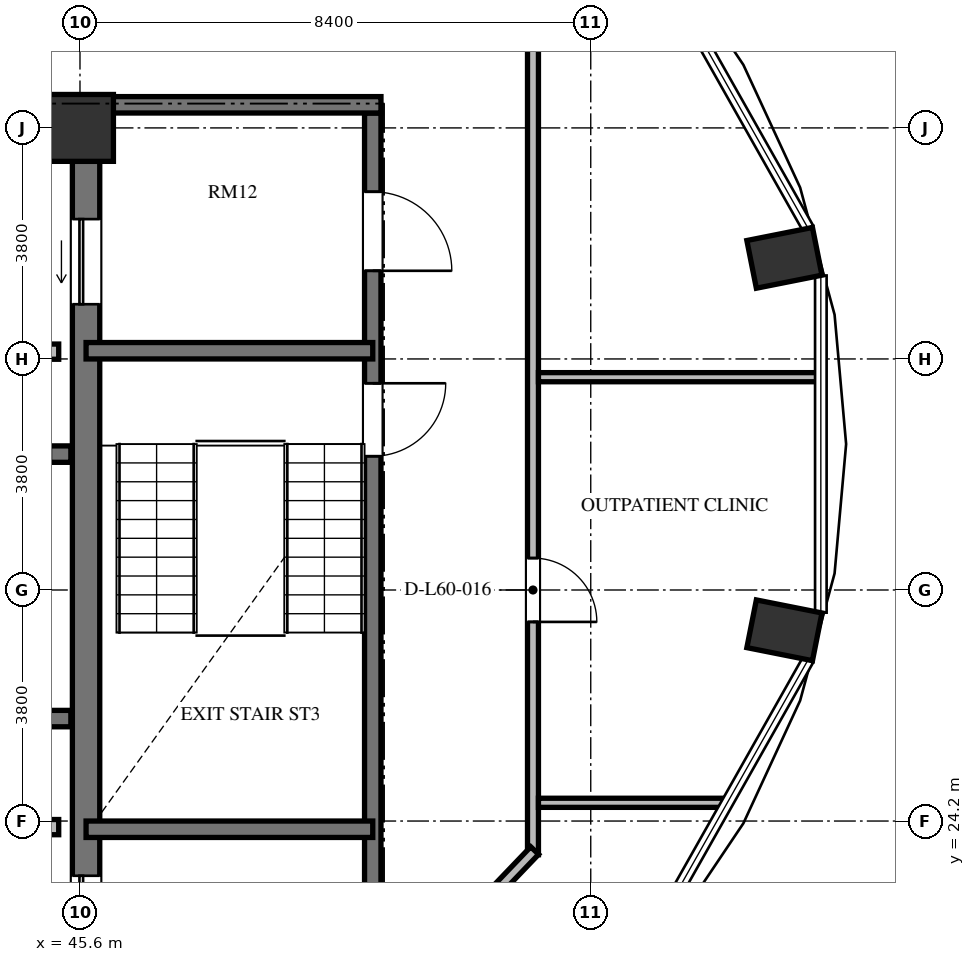
"""IFC4 building model, lengths in metres.
Left out: names, types, materials, properties, quantities, classifications, styles, units other than length and angle.
Written with IfcOpenShell. Run it as: python <this file> out.ifc"""

import sys

from ifc_helpers import new_model, si_unit, direction, frame, frame_2d, origin, origin_2d, place, context, subcontext, project, spatial, rectangle, extrude, element, fill, save


model = new_model("IFC4")
c1 = context("Model", 3, precision=1e-05, world=origin(), true_north=direction((0.0, 1.0)))
c2 = subcontext(c1, "Body", "Model", "MODEL_VIEW")
j1 = project(units=[si_unit("LENGTHUNIT", "METRE"), si_unit("PLANEANGLEUNIT", "RADIAN")], contexts=[c1])
p1 = place(None, origin())
s1 = spatial("IfcSite", under=j1, at=p1, CompositionType="ELEMENT")
p2 = place(p1, origin())
s2 = spatial("IfcBuilding", under=s1, at=p2, CompositionType="ELEMENT")
p3 = place(p2, frame((0.0, 0.0, 231.312)))
s3 = spatial("IfcBuildingStorey", under=s2, at=p3, CompositionType="ELEMENT", Elevation=231.312)
for number, where, z_axis, x_axis in (
    (1, (57.185, 27.337, 0.0), (0.0, 0.0, 1.0), (0.981, -0.195, 0.0)),
    (2, (57.185, 33.463, 0.0), (0.0, 0.0, 1.0), (0.981, 0.195, 0.0)),
):
    element("IfcColumn", number, at=place(p3, frame(where, z_axis=z_axis, x_axis=x_axis)), inside=s3, PredefinedType="COLUMN", context=c2, shape_type="SweptSolid", body=[
        extrude(rectangle(XDim=1.1, YDim=0.8, at=origin_2d()), origin(), (0.0, 0.0, 1.0), 3.648),
    ])
p4 = place(p3, frame((45.6, 35.6, 0.0), z_axis=(0.0, 0.0, 1.0), x_axis=(1.0, 0.0, 0.0)))
e3 = element("IfcColumn", 3, at=p4, inside=s3, PredefinedType="COLUMN", context=c2, shape_type="SweptSolid", body=[
    extrude(rectangle(XDim=1.1, YDim=1.1, at=origin_2d()), origin(), (0.0, 0.0, 1.0), 3.648),
])
p5 = place(p3, frame((45.7, 20.95, 0.0), z_axis=(0.0, 0.0, 1.0), x_axis=(0.0, 1.0, 0.0)))
e4 = element("IfcWall", 4, at=p5, inside=s3, PredefinedType="SHEAR", context=c2, shape_type="SweptSolid", body=[
    extrude(rectangle(XDim=14.1, YDim=0.45, at=frame_2d((7.05, 0.0))), origin(), (0.0, 0.0, 1.0), 3.648),
])
p6 = place(p5, frame((11.75, 0.0, 0.0)))
e5 = element("IfcOpeningElement", 5, at=p6, cuts=e4, PredefinedType="OPENING", context=c2, shape_type="SweptSolid", body=[
    extrude(rectangle(XDim=1.4, YDim=2.3, at=frame_2d((0.7, 1.15))), frame((0.0, 0.235, 0.0), z_axis=(0.0, -1.0, 0.0), x_axis=(1.0, 0.0, 0.0)), (0.0, 0.0, 1.0), 0.47),
])
p7 = place(p5, frame((0.95, 0.0, 0.0)))
e6 = element("IfcOpeningElement", 6, at=p7, cuts=e4, PredefinedType="OPENING", context=c2, shape_type="SweptSolid", body=[
    extrude(rectangle(XDim=1.4, YDim=2.3, at=frame_2d((0.7, 1.15))), frame((0.0, 0.235, 0.0), z_axis=(0.0, -1.0, 0.0), x_axis=(1.0, 0.0, 0.0)), (0.0, 0.0, 1.0), 0.47),
])
p8 = place(p3, frame((37.465, 30.235, 0.0), z_axis=(0.0, 0.0, 1.0), x_axis=(1.0, 0.0, 0.0)))
e7 = element("IfcWall", 7, at=p8, inside=s3, PredefinedType="SHEAR", context=c2, shape_type="SweptSolid", body=[
    extrude(rectangle(XDim=7.985, YDim=0.27, at=frame_2d((3.992, 0.0))), origin(), (0.0, 0.0, 1.0), 3.648),
])
p9 = place(p8, frame((6.455, 0.0, 0.0)))
e8 = element("IfcOpeningElement", 8, at=p9, cuts=e7, PredefinedType="OPENING", context=c2, shape_type="SweptSolid", body=[
    extrude(rectangle(XDim=1.2, YDim=2.15, at=frame_2d((0.6, 1.075))), frame((0.0, 0.145, 0.0), z_axis=(0.0, -1.0, 0.0), x_axis=(1.0, 0.0, 0.0)), (0.0, 0.0, 1.0), 0.29),
])
p10 = place(p3, frame((37.465, 25.885, 0.0), z_axis=(0.0, 0.0, 1.0), x_axis=(1.0, 0.0, 0.0)))
e9 = element("IfcWall", 9, at=p10, inside=s3, PredefinedType="SHEAR", context=c2, shape_type="SweptSolid", body=[
    extrude(rectangle(XDim=7.985, YDim=0.27, at=frame_2d((3.992, 0.0))), origin(), (0.0, 0.0, 1.0), 3.648),
])
for number, where, z_axis, x_axis in (
    (10, (42.95, 31.92, 0.0), (0.0, 0.0, 1.0), (1.0, 0.0, 0.0)),
    (11, (42.95, 24.1, 0.0), (0.0, 0.0, 1.0), (1.0, 0.0, 0.0)),
):
    element("IfcWall", number, at=place(p3, frame(where, z_axis=z_axis, x_axis=x_axis)), inside=s3, PredefinedType="SOLIDWALL", context=c2, shape_type="SweptSolid", body=[
        extrude(rectangle(XDim=2.3, YDim=0.25, at=frame_2d((1.15, 0.0))), origin(), (0.0, 0.0, 1.0), 3.448),
    ])
p11 = place(p3, frame((50.415, 35.845, 0.0), z_axis=(0.0, 0.0, 1.0), x_axis=(0.0, -1.0, 0.0)))
e12 = element("IfcWall", 12, at=p11, inside=s3, PredefinedType="SHEAR", context=c2, shape_type="SweptSolid", body=[
    extrude(rectangle(XDim=15.825, YDim=0.27, at=frame_2d((7.913, 0.0))), origin(), (0.0, 0.0, 1.0), 3.648),
])
p12 = place(p11, frame((4.445, 0.0, 0.0)))
e13 = element("IfcOpeningElement", 13, at=p12, cuts=e12, PredefinedType="OPENING", context=c2, shape_type="SweptSolid", body=[
    extrude(rectangle(XDim=1.2, YDim=2.15, at=frame_2d((0.6, 1.075))), frame((0.0, 0.145, 0.0), z_axis=(0.0, -1.0, 0.0), x_axis=(1.0, 0.0, 0.0)), (0.0, 0.0, 1.0), 0.29),
])
p13 = place(p11, frame((1.295, 0.0, 0.0)))
e14 = element("IfcOpeningElement", 14, at=p13, cuts=e12, PredefinedType="OPENING", context=c2, shape_type="SweptSolid", body=[
    extrude(rectangle(XDim=1.3, YDim=2.2, at=frame_2d((0.65, 1.1))), frame((0.0, 0.145, 0.0), z_axis=(0.0, -1.0, 0.0), x_axis=(1.0, 0.0, 0.0)), (0.0, 0.0, 1.0), 0.29),
])
p14 = place(p11, frame((13.095, 0.0, 0.0)))
e15 = element("IfcOpeningElement", 15, at=p14, cuts=e12, PredefinedType="OPENING", context=c2, shape_type="SweptSolid", body=[
    extrude(rectangle(XDim=1.3, YDim=2.2, at=frame_2d((0.65, 1.1))), frame((0.0, 0.145, 0.0), z_axis=(0.0, -1.0, 0.0), x_axis=(1.0, 0.0, 0.0)), (0.0, 0.0, 1.0), 0.29),
])
p15 = place(p3, frame((45.925, 35.98, 0.0), z_axis=(0.0, 0.0, 1.0), x_axis=(1.0, 0.0, 0.0)))
e16 = element("IfcWall", 16, at=p15, inside=s3, PredefinedType="SHEAR", context=c2, shape_type="SweptSolid", body=[
    extrude(rectangle(XDim=4.625, YDim=0.27, at=frame_2d((2.312, 0.0))), origin(), (0.0, 0.0, 1.0), 3.648),
])
for number, where, z_axis, x_axis in (
    (17, (45.7, 31.935, 0.0), (0.0, 0.0, 1.0), (1.0, 0.0, 0.0)),
    (18, (45.7, 24.065, 0.0), (0.0, 0.0, 1.0), (1.0, 0.0, 0.0)),
):
    element("IfcWall", number, at=place(p3, frame(where, z_axis=z_axis, x_axis=x_axis)), inside=s3, PredefinedType="SHEAR", context=c2, shape_type="SweptSolid", body=[
        extrude(rectangle(XDim=4.715, YDim=0.27, at=frame_2d((2.357, 0.0))), origin(), (0.0, 0.0, 1.0), 3.648),
    ])
p16 = place(p3, frame((53.05, 37.155, 0.0), z_axis=(0.0, 0.0, 1.0), x_axis=(0.0, -1.0, 0.0)))
e19 = element("IfcWall", 19, at=p16, inside=s3, PredefinedType="PARTITIONING", context=c2, shape_type="SweptSolid", body=[
    extrude(rectangle(XDim=13.509, YDim=0.18, at=frame_2d((6.754, 0.0))), origin(), (0.0, 0.0, 1.0), 3.448),
])
p17 = place(p16, frame((8.629, 0.0, 0.0)))
e20 = element("IfcOpeningElement", 20, at=p17, cuts=e19, PredefinedType="OPENING", context=c2, shape_type="SweptSolid", body=[
    extrude(rectangle(XDim=1.05, YDim=2.15, at=frame_2d((0.525, 1.075))), frame((0.0, 0.1, 0.0), z_axis=(0.0, -1.0, 0.0), x_axis=(1.0, 0.0, 0.0)), (0.0, 0.0, 1.0), 0.2),
])
p18 = place(p3, frame((53.078, 23.714, 0.0), z_axis=(0.0, 0.0, 1.0), x_axis=(-0.691353379446, -0.722516785085, 0.0)))
e21 = element("IfcWall", 21, at=p18, inside=s3, PredefinedType="PARTITIONING", context=c2, shape_type="SweptSolid", body=[
    extrude(rectangle(XDim=3.604, YDim=0.18, at=frame_2d((1.802, 0.0))), origin(), (0.0, 0.0, 1.0), 3.448),
])
p19 = place(p3, frame((53.14, 24.5, 0.0), z_axis=(0.0, 0.0, 1.0), x_axis=(1.0, 0.0, 0.0)))
e22 = element("IfcWall", 22, at=p19, inside=s3, PredefinedType="PARTITIONING", context=c2, shape_type="SweptSolid", body=[
    extrude(rectangle(XDim=3.095, YDim=0.15, at=frame_2d((1.548, 0.0))), origin(), (0.0, 0.0, 1.0), 3.448),
])
p20 = place(p3, frame((53.14, 31.5, 0.0), z_axis=(0.0, 0.0, 1.0), x_axis=(1.0, 0.0, 0.0)))
e23 = element("IfcWall", 23, at=p20, inside=s3, PredefinedType="PARTITIONING", context=c2, shape_type="SweptSolid", body=[
    extrude(rectangle(XDim=4.632, YDim=0.15, at=frame_2d((2.316, 0.0))), origin(), (0.0, 0.0, 1.0), 3.448),
])
p21 = place(p6, origin())
e24 = element("IfcDoor", 24, at=p21, inside=s3, OperationType="SLIDING_TO_LEFT", PredefinedType="DOOR", context=c2, shape_type="SweptSolid", body=[
    extrude(rectangle(XDim=1.4, YDim=2.3, at=frame_2d((0.7, 1.15))), frame((0.0, 0.025, 0.0), z_axis=(0.0, -1.0, 0.0), x_axis=(1.0, 0.0, 0.0)), (0.0, 0.0, 1.0), 0.05),
])
fill(e5, e24)
p22 = place(p7, origin())
e25 = element("IfcDoor", 25, at=p22, inside=s3, OperationType="SLIDING_TO_LEFT", PredefinedType="DOOR", context=c2, shape_type="SweptSolid", body=[
    extrude(rectangle(XDim=1.4, YDim=2.3, at=frame_2d((0.7, 1.15))), frame((0.0, 0.025, 0.0), z_axis=(0.0, -1.0, 0.0), x_axis=(1.0, 0.0, 0.0)), (0.0, 0.0, 1.0), 0.05),
])
fill(e6, e25)
p23 = place(p12, origin())
e26 = element("IfcDoor", 26, at=p23, inside=s3, OperationType="SINGLE_SWING_LEFT", PredefinedType="DOOR", context=c2, shape_type="SweptSolid", body=[
    extrude(rectangle(XDim=1.2, YDim=2.15, at=frame_2d((0.6, 1.075))), frame((0.0, 0.025, 0.0), z_axis=(0.0, -1.0, 0.0), x_axis=(1.0, 0.0, 0.0)), (0.0, 0.0, 1.0), 0.05),
])
fill(e13, e26)
p24 = place(p13, origin())
e27 = element("IfcDoor", 27, at=p24, inside=s3, OperationType="SINGLE_SWING_RIGHT", PredefinedType="DOOR", context=c2, shape_type="SweptSolid", body=[
    extrude(rectangle(XDim=1.3, YDim=2.2, at=frame_2d((0.65, 1.1))), frame((0.0, 0.025, 0.0), z_axis=(0.0, -1.0, 0.0), x_axis=(1.0, 0.0, 0.0)), (0.0, 0.0, 1.0), 0.05),
])
fill(e14, e27)
p25 = place(p17, origin())
e28 = element("IfcDoor", 28, at=p25, inside=s3, OperationType="SINGLE_SWING_RIGHT", PredefinedType="DOOR", context=c2, shape_type="SweptSolid", body=[
    extrude(rectangle(XDim=1.05, YDim=2.15, at=frame_2d((0.525, 1.075))), frame((0.0, 0.025, 0.0), z_axis=(0.0, -1.0, 0.0), x_axis=(1.0, 0.0, 0.0)), (0.0, 0.0, 1.0), 0.05),
])
fill(e20, e28)
save(model, sys.argv[1])
